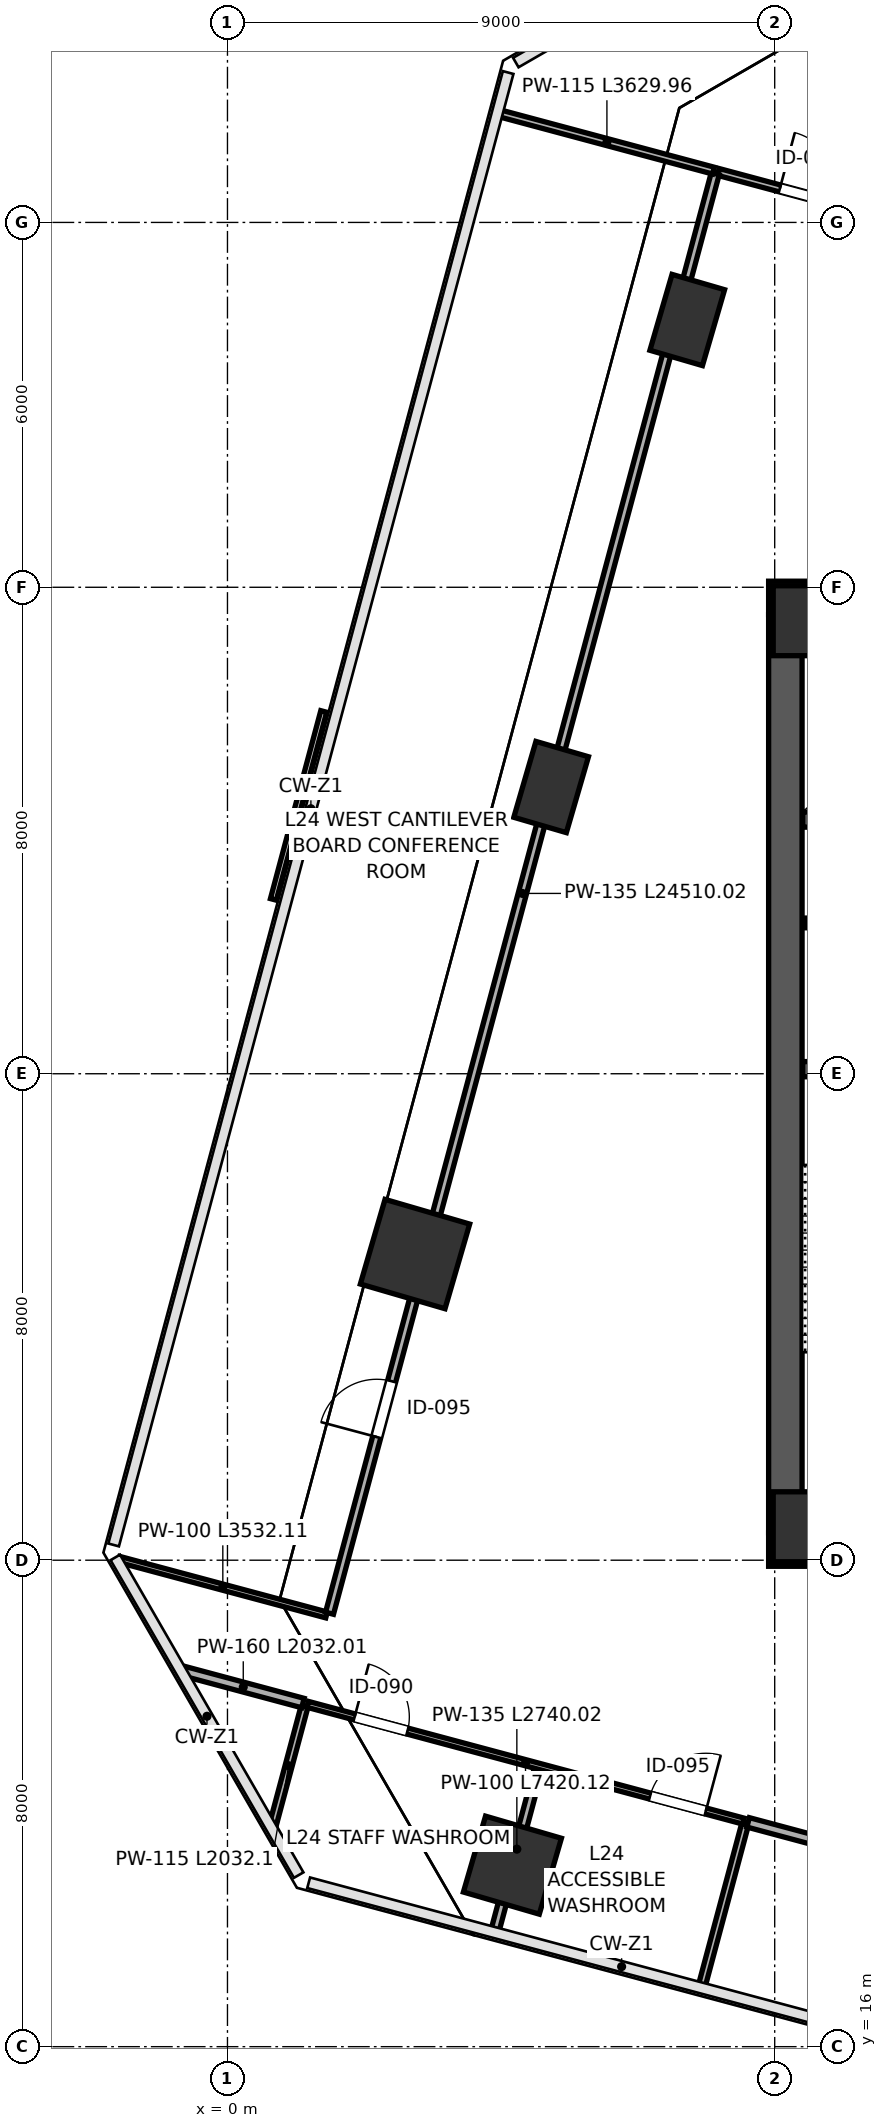
"""IFC4 building model, lengths in metres.
Left out: names, types, materials, properties, quantities, classifications, styles, units other than length and angle.
Written with IfcOpenShell. Run it as: python <this file> out.ifc"""

import sys

from ifc_helpers import new_model, si_unit, direction, frame, frame_2d, origin, origin_2d, place, context, subcontext, project, spatial, rectangle, extrude, clip, halfspace, source, transform, mapped, element, fill, save


model = new_model("IFC4")
c1 = context("Model", 3, precision=1e-05, world=origin(), true_north=direction((0.0, 1.0)))
c2 = subcontext(c1, "Body", "Model", "MODEL_VIEW")
j1 = project(units=[si_unit("LENGTHUNIT", "METRE"), si_unit("PLANEANGLEUNIT", "RADIAN")], contexts=[c1])
p1 = place(None, origin())
s1 = spatial("IfcSite", under=j1, at=p1, CompositionType="ELEMENT")
p2 = place(p1, origin())
s2 = spatial("IfcBuilding", under=s1, at=p2, CompositionType="ELEMENT")
p3 = place(p2, frame((0.0, 0.0, 108.4)))
s3 = spatial("IfcBuildingStorey", under=s2, at=p3, CompositionType="ELEMENT", Elevation=108.4)
m1 = source(origin(), c2, "Body", "SweptSolid", [
    extrude(rectangle(XDim=1.15, YDim=1.15, at=origin_2d()), origin(), (0.0, 0.0, 1.0), 4.199),
])
for number, where, z_axis, x_axis in (
    (1, (9.55, 24.55, 0.001), (0.0, 0.0, 1.0), (1.0, 0.0, 0.0)),
    (2, (9.55, 39.45, 0.001), (0.0, 0.0, 1.0), (1.0, 0.0, 0.0)),
):
    element("IfcColumn", number, at=place(p3, frame(where, z_axis=z_axis, x_axis=x_axis)), inside=s3, PredefinedType="COLUMN", context=c2, shape_type="MappedRepresentation", body=[
        mapped(m1, transform((0.0, 0.0, 0.0), scale=1.0)),
    ])
p4 = place(p3, frame((4.686, 18.985, 0.0), z_axis=(-0.066210024201, 0.087528958695, 0.99395921148), x_axis=(0.933463595819, 0.357354912566, 0.03071126414)))
e3 = element("IfcColumn", 3, at=p4, inside=s3, PredefinedType="COLUMN", context=c2, shape_type="Clipping", body=[
    clip(clip(extrude(rectangle(XDim=1.3, YDim=1.3, at=origin_2d()), origin(), (0.0, 0.0, 1.0), 4.226), halfspace(frame((0.0, 0.0, 0.09), z_axis=(0.0, 0.0, -1.0), x_axis=(1.0, 0.0, 0.0)), False)), halfspace(frame((0.0, 0.0, 4.136), z_axis=(0.0, 0.0, 1.0), x_axis=(1.0, 0.0, 0.0)), False)),
])
p5 = place(p3, frame((3.084, 29.035, 0.0), z_axis=(-0.014290167127, 0.095402775679, 0.995336175127), x_axis=(0.990716932944, -0.133233881295, 0.026994289275)))
e4 = element("IfcColumn", 4, at=p5, inside=s3, PredefinedType="COLUMN", context=c2, shape_type="Clipping", body=[
    clip(clip(extrude(rectangle(XDim=1.45, YDim=1.45, at=origin_2d()), origin(), (0.0, 0.0, 1.0), 4.22), halfspace(frame((0.0, 0.0, 0.088), z_axis=(0.0, 0.0, -1.0), x_axis=(1.0, 0.0, 0.0)), False)), halfspace(frame((0.0, 0.0, 4.132), z_axis=(0.0, 0.0, 1.0), x_axis=(1.0, 0.0, 0.0)), False)),
])
p6 = place(p3, frame((5.323, 36.715, 0.0), z_axis=(0.025304327695, 0.083440586291, 0.996191427166), x_axis=(0.83783221016, -0.545382313936, 0.024399165226)))
e5 = element("IfcColumn", 5, at=p6, inside=s3, PredefinedType="PILASTER", context=c2, shape_type="Clipping", body=[
    clip(clip(extrude(rectangle(XDim=0.9, YDim=1.3, at=origin_2d()), origin(), (0.0, 0.0, 1.0), 4.216), halfspace(frame((0.0, 0.0, 0.066), z_axis=(0.0, 0.0, -1.0), x_axis=(1.0, 0.0, 0.0)), False)), halfspace(frame((0.0, 0.0, 4.15), z_axis=(0.0, 0.0, 1.0), x_axis=(1.0, 0.0, 0.0)), False)),
])
p7 = place(p3, frame((7.562, 44.396, 0.0), z_axis=(0.064855729905, 0.071335517371, 0.995341638966), x_axis=(0.522988465649, -0.85191268616, 0.026978509186)))
e6 = element("IfcColumn", 6, at=p7, inside=s3, PredefinedType="PILASTER", context=c2, shape_type="Clipping", body=[
    clip(clip(extrude(rectangle(XDim=0.9, YDim=1.3, at=origin_2d()), origin(), (0.0, 0.0, 1.0), 4.22), halfspace(frame((0.0, 0.0, 0.073), z_axis=(0.0, 0.0, -1.0), x_axis=(1.0, 0.0, 0.0)), False)), halfspace(frame((0.0, 0.0, 4.146), z_axis=(0.0, 0.0, 1.0), x_axis=(1.0, 0.0, 0.0)), False)),
])
p8 = place(p3, frame((9.175, 24.45, 0.0), z_axis=(0.0, 0.0, 1.0), x_axis=(0.0, 1.0, 0.0)))
e7 = element("IfcWall", 7, at=p8, inside=s3, PredefinedType="SHEAR", context=c2, shape_type="SweptSolid", body=[
    extrude(rectangle(XDim=15.1, YDim=0.55, at=frame_2d((7.55, 0.0))), origin(), (0.0, 0.0, 1.0), 3.96),
])
for number, where, z_axis, x_axis in (
    (8, (8.9, 24.175, 0.0), (0.0, 0.0, 1.0), (1.0, 0.0, 0.0)),
    (9, (8.9, 39.825, 0.0), (0.0, 0.0, 1.0), (1.0, 0.0, 0.0)),
):
    element("IfcWall", number, at=place(p3, frame(where, z_axis=z_axis, x_axis=x_axis)), inside=s3, PredefinedType="SHEAR", context=c2, shape_type="SweptSolid", body=[
        extrude(rectangle(XDim=18.2, YDim=0.55, at=frame_2d((9.1, 0.0))), origin(), (0.0, 0.0, 1.0), 3.96),
    ])
p9 = place(p3, frame((9.46, 32.075, 0.0), z_axis=(0.0, 0.0, 1.0), x_axis=(1.0, 0.0, 0.0)))
e10 = element("IfcWall", 10, at=p9, inside=s3, PredefinedType="SHEAR", context=c2, shape_type="SweptSolid", body=[
    extrude(rectangle(XDim=3.29, YDim=0.25, at=frame_2d((1.645, 0.0))), origin(), (0.0, 0.0, 1.0), 3.96),
])
p10 = place(p3, frame((9.46, 36.18, 0.0), z_axis=(0.0, 0.0, 1.0), x_axis=(1.0, 0.0, 0.0)))
e11 = element("IfcWall", 11, at=p10, inside=s3, PredefinedType="SHEAR", context=c2, shape_type="SweptSolid", body=[
    extrude(rectangle(XDim=3.79, YDim=0.25, at=frame_2d((1.895, 0.0))), origin(), (0.0, 0.0, 1.0), 3.96),
])
p11 = place(p10, frame((2.62, 0.0, 0.0)))
e12 = element("IfcOpeningElement", 12, at=p11, cuts=e11, PredefinedType="OPENING", context=c2, shape_type="SweptSolid", body=[
    extrude(rectangle(XDim=0.85, YDim=2.1, at=frame_2d((0.425, 1.05))), frame((0.0, 0.135, 0.0), z_axis=(0.0, -1.0, 0.0), x_axis=(1.0, 0.0, 0.0)), (0.0, 0.0, 1.0), 0.27),
])
p12 = place(p10, frame((0.85, 0.0, 0.0)))
e13 = element("IfcOpeningElement", 13, at=p12, cuts=e11, PredefinedType="OPENING", context=c2, shape_type="SweptSolid", body=[
    extrude(rectangle(XDim=1.3, YDim=2.25, at=frame_2d((0.65, 1.125))), frame((0.0, 0.135, 0.0), z_axis=(0.0, -1.0, 0.0), x_axis=(1.0, 0.0, 0.0)), (0.0, 0.0, 1.0), 0.27),
])
p13 = place(p3, frame((9.49, 34.48, 0.0), z_axis=(0.0, 0.0, 1.0), x_axis=(1.0, 0.0, 0.0)))
e14 = element("IfcWall", 14, at=p13, inside=s3, PredefinedType="PARTITIONING", context=c2, shape_type="SweptSolid", body=[
    extrude(rectangle(XDim=3.7, YDim=0.16, at=frame_2d((1.85, 0.0))), origin(), (0.0, 0.0, 1.0), 3.96),
])
p14 = place(p13, frame((1.15, 0.0, 0.0)))
e15 = element("IfcOpeningElement", 15, at=p14, cuts=e14, PredefinedType="OPENING", context=c2, shape_type="SweptSolid", body=[
    extrude(rectangle(XDim=0.9, YDim=2.15, at=frame_2d((0.45, 1.075))), frame((0.0, 0.09, 0.0), z_axis=(0.0, -1.0, 0.0), x_axis=(1.0, 0.0, 0.0)), (0.0, 0.0, 1.0), 0.18),
])
p15 = place(p3, frame((0.743, 19.639, 0.0), z_axis=(0.0, 0.0, 1.0), x_axis=(0.258784127083, 0.965935181868, 0.0)))
e16 = element("IfcWall", 16, at=p15, inside=s3, PredefinedType="PARTITIONING", context=c2, shape_type="SweptSolid", body=[
    extrude(rectangle(XDim=2.032, YDim=0.115, at=frame_2d((1.016, 0.0))), origin(), (0.0, 0.0, 1.0), 3.96),
])
p16 = place(p3, frame((-0.722, 22.177, 0.0), z_axis=(0.0, 0.0, 1.0), x_axis=(0.965965207833, -0.258672026426, 0.0)))
e17 = element("IfcWall", 17, at=p16, inside=s3, PredefinedType="PARTITIONING", context=c2, shape_type="SweptSolid", body=[
    extrude(rectangle(XDim=2.032, YDim=0.16, at=frame_2d((1.016, 0.0))), origin(), (0.0, 0.0, 1.0), 3.96),
])
p17 = place(p3, frame((4.405, 17.925, 0.0), z_axis=(0.0, 0.0, 1.0), x_axis=(0.25874944638, 0.965944472523, 0.0)))
e18 = element("IfcWall", 18, at=p17, inside=s3, PredefinedType="PARTITIONING", context=c2, shape_type="SweptSolid", body=[
    extrude(rectangle(XDim=2.74, YDim=0.135, at=frame_2d((1.37, 0.0))), origin(), (0.0, 0.0, 1.0), 3.095),
])
p18 = place(p3, frame((7.805, 17.014, 0.0), z_axis=(0.0, 0.0, 1.0), x_axis=(0.258832579125, 0.965922199757, 0.0)))
e19 = element("IfcWall", 19, at=p18, inside=s3, PredefinedType="PARTITIONING", context=c2, shape_type="SweptSolid", body=[
    extrude(rectangle(XDim=2.74, YDim=0.115, at=frame_2d((1.37, 0.0))), origin(), (0.0, 0.0, 1.0), 3.095),
])
p19 = place(p3, frame((1.318, 21.63, 0.0), z_axis=(0.0, 0.0, 1.0), x_axis=(0.965935568552, -0.258782683744, 0.0)))
e20 = element("IfcWall", 20, at=p19, inside=s3, PredefinedType="PARTITIONING", context=c2, shape_type="SweptSolid", body=[
    extrude(rectangle(XDim=7.42, YDim=0.1, at=frame_2d((3.71, 0.0))), origin(), (0.0, 0.0, 1.0), 3.96),
])
p20 = place(p19, frame((0.8, 0.0, 0.0)))
e21 = element("IfcOpeningElement", 21, at=p20, cuts=e20, PredefinedType="OPENING", context=c2, shape_type="SweptSolid", body=[
    extrude(rectangle(XDim=0.9, YDim=2.15, at=frame_2d((0.45, 1.075))), frame((0.0, 0.06, 0.0), z_axis=(0.0, -1.0, 0.0), x_axis=(1.0, 0.0, 0.0)), (0.0, 0.0, 1.0), 0.12),
])
p21 = place(p19, frame((5.83, 0.0, 0.0)))
e22 = element("IfcOpeningElement", 22, at=p21, cuts=e20, PredefinedType="OPENING", context=c2, shape_type="SweptSolid", body=[
    extrude(rectangle(XDim=0.95, YDim=2.15, at=frame_2d((0.475, 1.075))), frame((0.0, 0.06, 0.0), z_axis=(0.0, -1.0, 0.0), x_axis=(1.0, 0.0, 0.0)), (0.0, 0.0, 1.0), 0.12),
])
p22 = place(p3, frame((8.563, 19.689, 0.0), z_axis=(0.0, 0.0, 1.0), x_axis=(0.965928721089, -0.258808241319, 0.0)))
e23 = element("IfcWall", 23, at=p22, inside=s3, PredefinedType="PARTITIONING", context=c2, shape_type="SweptSolid", body=[
    extrude(rectangle(XDim=18.66, YDim=0.16, at=frame_2d((9.33, 0.0))), origin(), (0.0, 0.0, 1.0), 3.96),
])
p23 = place(p22, frame((1.45, 0.0, 0.0)))
e24 = element("IfcOpeningElement", 24, at=p23, cuts=e23, PredefinedType="OPENING", context=c2, shape_type="SweptSolid", body=[
    extrude(rectangle(XDim=0.95, YDim=2.15, at=frame_2d((0.475, 1.075))), frame((0.0, 0.09, 0.0), z_axis=(0.0, -1.0, 0.0), x_axis=(1.0, 0.0, 0.0)), (0.0, 0.0, 1.0), 0.18),
])
p24 = place(p3, frame((8.071, 46.831, 0.0), z_axis=(0.0, 0.0, 1.0), x_axis=(0.965925848141, -0.258818963551, 0.0)))
e25 = element("IfcWall", 25, at=p24, inside=s3, PredefinedType="PARTITIONING", context=c2, shape_type="SweptSolid", body=[
    extrude(rectangle(XDim=26.16, YDim=0.115, at=frame_2d((13.08, 0.0))), origin(), (0.0, 0.0, 1.0), 3.96),
])
p25 = place(p24, frame((1.05, 0.0, 0.0)))
e26 = element("IfcOpeningElement", 26, at=p25, cuts=e25, PredefinedType="OPENING", context=c2, shape_type="SweptSolid", body=[
    extrude(rectangle(XDim=0.95, YDim=2.15, at=frame_2d((0.475, 1.075))), frame((0.0, 0.067, 0.0), z_axis=(0.0, -1.0, 0.0), x_axis=(1.0, 0.0, 0.0)), (0.0, 0.0, 1.0), 0.135),
])
p26 = place(p3, frame((-1.782, 24.014, 0.0), z_axis=(0.0, 0.0, 1.0), x_axis=(0.965936019953, -0.258780998834, 0.0)))
e27 = element("IfcWall", 27, at=p26, inside=s3, PredefinedType="PARTITIONING", context=c2, shape_type="SweptSolid", body=[
    extrude(rectangle(XDim=3.532, YDim=0.1, at=frame_2d((1.766, 0.0))), origin(), (0.0, 0.0, 1.0), 3.96),
])
p27 = place(p3, frame((1.678, 23.128, 0.0), z_axis=(0.0, 0.0, 1.0), x_axis=(0.258813756198, 0.965927243431, 0.0)))
e28 = element("IfcWall", 28, at=p27, inside=s3, PredefinedType="PARTITIONING", context=c2, shape_type="SweptSolid", body=[
    extrude(rectangle(XDim=24.51, YDim=0.135, at=frame_2d((12.255, 0.0))), origin(), (0.0, 0.0, 1.0), 3.095),
])
p28 = place(p27, frame((3.0, 0.0, 0.0)))
e29 = element("IfcOpeningElement", 29, at=p28, cuts=e28, PredefinedType="OPENING", context=c2, shape_type="SweptSolid", body=[
    extrude(rectangle(XDim=0.95, YDim=2.15, at=frame_2d((0.475, 1.075))), frame((0.0, 0.078, 0.0), z_axis=(0.0, -1.0, 0.0), x_axis=(1.0, 0.0, 0.0)), (0.0, 0.0, 1.0), 0.155),
])
p29 = place(p3, frame((4.487, 47.791, 0.0), z_axis=(0.0, 0.0, 1.0), x_axis=(0.965930639999, -0.258801079426, 0.0)))
e30 = element("IfcWall", 30, at=p29, inside=s3, PredefinedType="PARTITIONING", context=c2, shape_type="SweptSolid", body=[
    extrude(rectangle(XDim=3.63, YDim=0.115, at=frame_2d((1.815, 0.0))), origin(), (0.0, 0.0, 1.0), 3.96),
])
m2 = source(origin(), c2, "Body", "SweptSolid", [
    extrude(rectangle(XDim=0.9, YDim=2.15, at=frame_2d((0.45, 1.075))), frame((0.0, 0.025, 0.0), z_axis=(0.0, -1.0, 0.0), x_axis=(1.0, 0.0, 0.0)), (0.0, 0.0, 1.0), 0.05),
])
p30 = place(p20, origin())
e31 = element("IfcDoor", 31, at=p30, inside=s3, OperationType="SINGLE_SWING_LEFT", PredefinedType="DOOR", context=c2, shape_type="MappedRepresentation", body=[
    mapped(m2, transform((0.0, 0.0, 0.0), scale=1.0)),
])
fill(e21, e31)
m3 = source(origin(), c2, "Body", "SweptSolid", [
    extrude(rectangle(XDim=0.95, YDim=2.15, at=frame_2d((0.475, 1.075))), frame((0.0, 0.025, 0.0), z_axis=(0.0, -1.0, 0.0), x_axis=(1.0, 0.0, 0.0)), (0.0, 0.0, 1.0), 0.05),
])
p31 = place(p21, origin())
e32 = element("IfcDoor", 32, at=p31, inside=s3, OperationType="SINGLE_SWING_RIGHT", PredefinedType="DOOR", context=c2, shape_type="MappedRepresentation", body=[
    mapped(m3, transform((0.0, 0.0, 0.0), scale=1.0)),
])
fill(e22, e32)
p32 = place(p25, origin())
e33 = element("IfcDoor", 33, at=p32, inside=s3, OperationType="SINGLE_SWING_LEFT", PredefinedType="DOOR", context=c2, shape_type="MappedRepresentation", body=[
    mapped(m3, transform((0.0, 0.0, 0.0), scale=1.0)),
])
fill(e26, e33)
p33 = place(p28, origin())
e34 = element("IfcDoor", 34, at=p33, inside=s3, OperationType="SINGLE_SWING_LEFT", PredefinedType="DOOR", context=c2, shape_type="MappedRepresentation", body=[
    mapped(m3, transform((0.0, 0.0, 0.0), scale=1.0)),
])
fill(e29, e34)
save(model, sys.argv[1])
